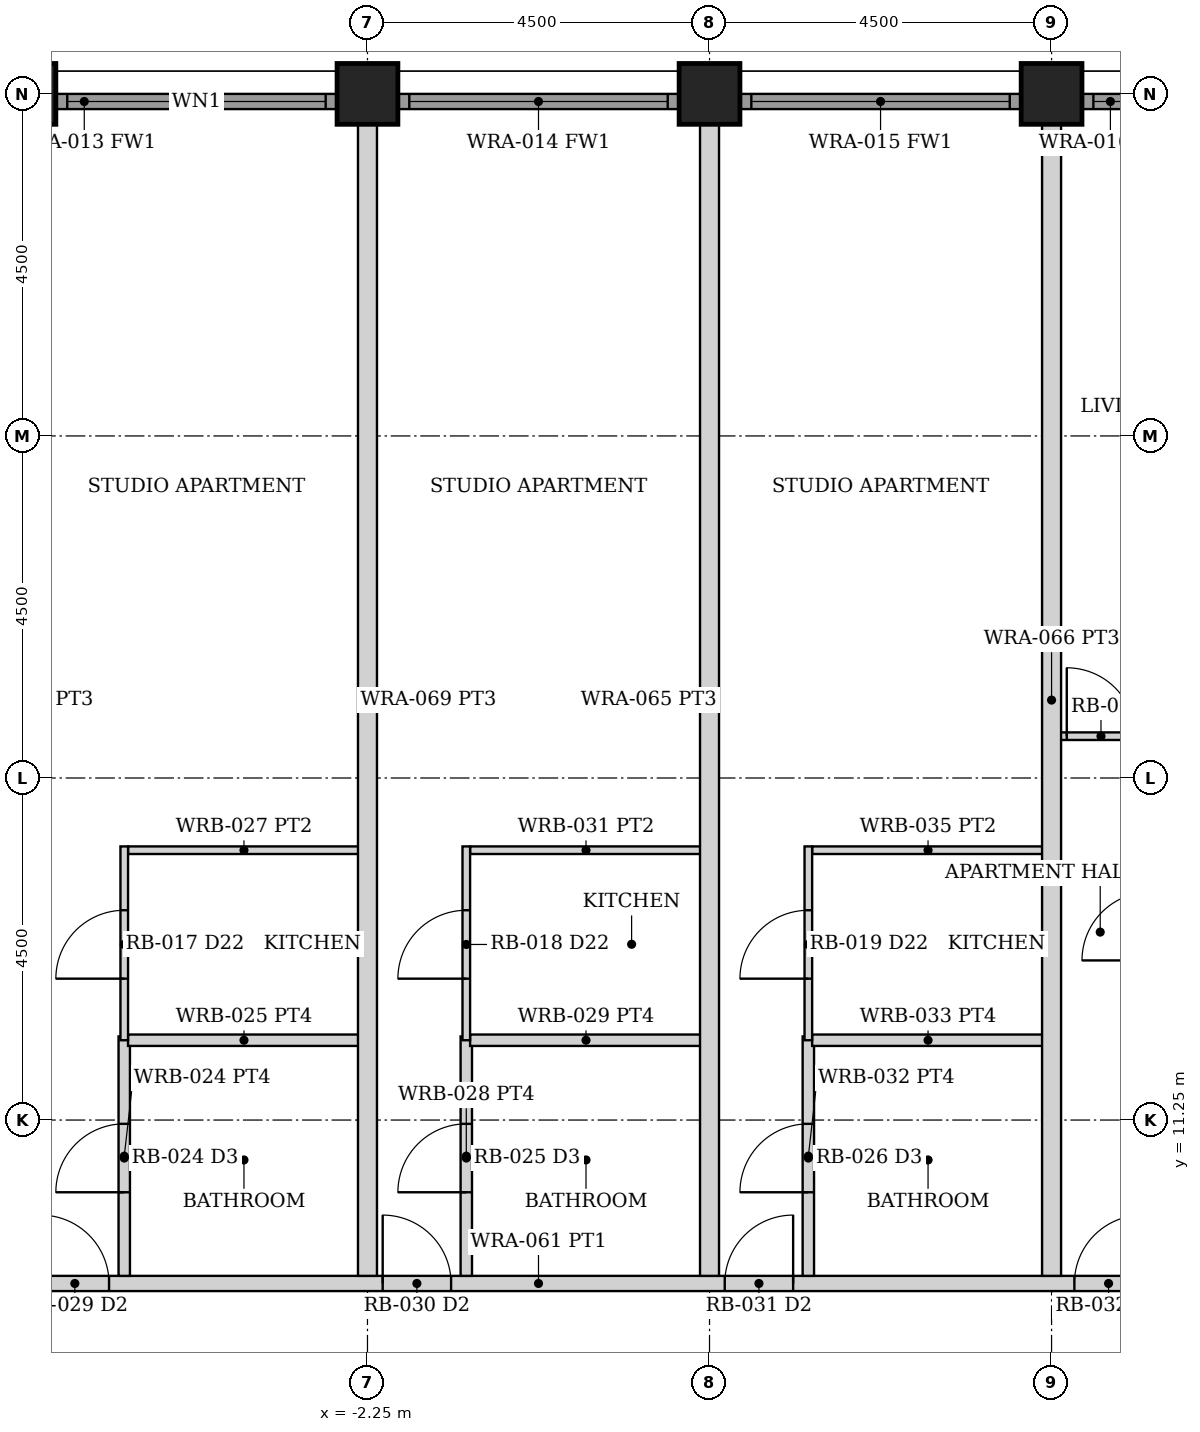
"""IFC4 building model, lengths in metres.
Left out: names, types, materials, properties, quantities, classifications, styles, units other than length and angle.
Written with IfcOpenShell. Run it as: python <this file> out.ifc"""

import sys

from ifc_helpers import new_model, si_unit, direction, frame, frame_2d, origin, origin_2d, place, context, subcontext, project, spatial, rectangle, hollow_rectangle, extrude, element, fill, save


model = new_model("IFC4")
c1 = context("Model", 3, precision=1e-05, world=origin(), true_north=direction((0.0, 1.0)))
c2 = subcontext(c1, "Body", "Model", "MODEL_VIEW")
j1 = project(units=[si_unit("LENGTHUNIT", "METRE"), si_unit("PLANEANGLEUNIT", "RADIAN")], contexts=[c1])
p1 = place(None, origin())
s1 = spatial("IfcSite", under=j1, at=p1, CompositionType="ELEMENT")
p2 = place(p1, origin())
s2 = spatial("IfcBuilding", under=s1, at=p2, CompositionType="ELEMENT")
p3 = place(p2, frame((0.0, 0.0, 37.0)))
s3 = spatial("IfcBuildingStorey", under=s2, at=p3, CompositionType="ELEMENT", Elevation=37.0)
for number, where, z_axis, x_axis in (
    (1, (-6.75, 24.75, 0.0), (0.0, 0.0, 1.0), (0.0, 1.0, 0.0)),
    (2, (-2.25, 24.75, 0.0), (0.0, 0.0, 1.0), (0.0, 1.0, 0.0)),
    (3, (2.25, 24.75, 0.0), (0.0, 0.0, 1.0), (0.0, 1.0, 0.0)),
    (4, (6.75, 24.75, 0.0), (0.0, 0.0, 1.0), (0.0, 1.0, 0.0)),
):
    element("IfcColumn", number, at=place(p3, frame(where, z_axis=z_axis, x_axis=x_axis)), inside=s3, PredefinedType="COLUMN", context=c2, shape_type="SweptSolid", body=[
        extrude(hollow_rectangle(XDim=0.8, YDim=0.8, WallThickness=0.07, at=origin_2d()), origin(), (0.0, 0.0, 1.0), 3.5),
    ])
p4 = place(p3, frame((-6.345, 24.65, 0.0), z_axis=(0.0, 0.0, 1.0), x_axis=(1.0, 0.0, 0.0)))
e5 = element("IfcWall", 5, at=p4, inside=s3, PredefinedType="SOLIDWALL", context=c2, shape_type="SweptSolid", body=[
    extrude(rectangle(XDim=3.69, YDim=0.2, at=frame_2d((1.845, 0.0))), origin(), (0.0, 0.0, 1.0), 2.379),
])
p5 = place(p4, frame((0.145, 0.0, 0.3)))
e6 = element("IfcOpeningElement", 6, at=p5, cuts=e5, PredefinedType="OPENING", context=c2, shape_type="SweptSolid", body=[
    extrude(rectangle(XDim=3.4, YDim=1.929, at=frame_2d((1.7, 0.964))), frame((0.0, 0.11, 0.0), z_axis=(0.0, -1.0, 0.0), x_axis=(1.0, 0.0, 0.0)), (0.0, 0.0, 1.0), 0.22),
])
p6 = place(p3, frame((-1.845, 24.65, 0.0), z_axis=(0.0, 0.0, 1.0), x_axis=(1.0, 0.0, 0.0)))
e7 = element("IfcWall", 7, at=p6, inside=s3, PredefinedType="SOLIDWALL", context=c2, shape_type="SweptSolid", body=[
    extrude(rectangle(XDim=3.69, YDim=0.2, at=frame_2d((1.845, 0.0))), origin(), (0.0, 0.0, 1.0), 2.379),
])
p7 = place(p6, frame((0.145, 0.0, 0.3)))
e8 = element("IfcOpeningElement", 8, at=p7, cuts=e7, PredefinedType="OPENING", context=c2, shape_type="SweptSolid", body=[
    extrude(rectangle(XDim=3.4, YDim=1.929, at=frame_2d((1.7, 0.964))), frame((0.0, 0.11, 0.0), z_axis=(0.0, -1.0, 0.0), x_axis=(1.0, 0.0, 0.0)), (0.0, 0.0, 1.0), 0.22),
])
p8 = place(p3, frame((2.655, 24.65, 0.0), z_axis=(0.0, 0.0, 1.0), x_axis=(1.0, 0.0, 0.0)))
e9 = element("IfcWall", 9, at=p8, inside=s3, PredefinedType="SOLIDWALL", context=c2, shape_type="SweptSolid", body=[
    extrude(rectangle(XDim=3.69, YDim=0.2, at=frame_2d((1.845, 0.0))), origin(), (0.0, 0.0, 1.0), 2.379),
])
p9 = place(p8, frame((0.145, 0.0, 0.3)))
e10 = element("IfcOpeningElement", 10, at=p9, cuts=e9, PredefinedType="OPENING", context=c2, shape_type="SweptSolid", body=[
    extrude(rectangle(XDim=3.4, YDim=1.929, at=frame_2d((1.7, 0.964))), frame((0.0, 0.11, 0.0), z_axis=(0.0, -1.0, 0.0), x_axis=(1.0, 0.0, 0.0)), (0.0, 0.0, 1.0), 0.22),
])
p10 = place(p3, frame((7.155, 24.65, 0.0), z_axis=(0.0, 0.0, 1.0), x_axis=(1.0, 0.0, 0.0)))
e11 = element("IfcWall", 11, at=p10, inside=s3, PredefinedType="SOLIDWALL", context=c2, shape_type="SweptSolid", body=[
    extrude(rectangle(XDim=3.69, YDim=0.2, at=frame_2d((1.845, 0.0))), origin(), (0.0, 0.0, 1.0), 2.379),
])
p11 = place(p10, frame((0.145, 0.0, 0.3)))
e12 = element("IfcOpeningElement", 12, at=p11, cuts=e11, PredefinedType="OPENING", context=c2, shape_type="SweptSolid", body=[
    extrude(rectangle(XDim=3.4, YDim=1.929, at=frame_2d((1.7, 0.964))), frame((0.0, 0.11, 0.0), z_axis=(0.0, -1.0, 0.0), x_axis=(1.0, 0.0, 0.0)), (0.0, 0.0, 1.0), 0.22),
])
p12 = place(p3, frame((-24.55, 9.1, 0.0), z_axis=(0.0, 0.0, 1.0), x_axis=(1.0, 0.0, 0.0)))
e13 = element("IfcWall", 13, at=p12, inside=s3, PredefinedType="PARTITIONING", context=c2, shape_type="SweptSolid", body=[
    extrude(rectangle(XDim=49.1, YDim=0.2, at=frame_2d((24.55, 0.0))), origin(), (0.0, 0.0, 1.0), 2.373),
])
p13 = place(p12, frame((5.1, 0.0, 0.0)))
e14 = element("IfcOpeningElement", 14, at=p13, cuts=e13, PredefinedType="OPENING", context=c2, shape_type="SweptSolid", body=[
    extrude(rectangle(XDim=0.9, YDim=2.1, at=frame_2d((0.45, 1.05))), frame((0.0, 0.11, 0.0), z_axis=(0.0, -1.0, 0.0), x_axis=(1.0, 0.0, 0.0)), (0.0, 0.0, 1.0), 0.22),
])
p14 = place(p12, frame((13.6, 0.0, 0.0)))
e15 = element("IfcOpeningElement", 15, at=p14, cuts=e13, PredefinedType="OPENING", context=c2, shape_type="SweptSolid", body=[
    extrude(rectangle(XDim=0.9, YDim=2.1, at=frame_2d((0.45, 1.05))), frame((0.0, 0.11, 0.0), z_axis=(0.0, -1.0, 0.0), x_axis=(1.0, 0.0, 0.0)), (0.0, 0.0, 1.0), 0.22),
])
p15 = place(p12, frame((18.0, 0.0, 0.0)))
e16 = element("IfcOpeningElement", 16, at=p15, cuts=e13, PredefinedType="OPENING", context=c2, shape_type="SweptSolid", body=[
    extrude(rectangle(XDim=0.9, YDim=2.1, at=frame_2d((0.45, 1.05))), frame((0.0, 0.11, 0.0), z_axis=(0.0, -1.0, 0.0), x_axis=(1.0, 0.0, 0.0)), (0.0, 0.0, 1.0), 0.22),
])
p16 = place(p12, frame((22.5, 0.0, 0.0)))
e17 = element("IfcOpeningElement", 17, at=p16, cuts=e13, PredefinedType="OPENING", context=c2, shape_type="SweptSolid", body=[
    extrude(rectangle(XDim=0.9, YDim=2.1, at=frame_2d((0.45, 1.05))), frame((0.0, 0.11, 0.0), z_axis=(0.0, -1.0, 0.0), x_axis=(1.0, 0.0, 0.0)), (0.0, 0.0, 1.0), 0.22),
])
p17 = place(p12, frame((27.0, 0.0, 0.0)))
e18 = element("IfcOpeningElement", 18, at=p17, cuts=e13, PredefinedType="OPENING", context=c2, shape_type="SweptSolid", body=[
    extrude(rectangle(XDim=0.9, YDim=2.1, at=frame_2d((0.45, 1.05))), frame((0.0, 0.11, 0.0), z_axis=(0.0, -1.0, 0.0), x_axis=(1.0, 0.0, 0.0)), (0.0, 0.0, 1.0), 0.22),
])
p18 = place(p12, frame((31.6, 0.0, 0.0)))
e19 = element("IfcOpeningElement", 19, at=p18, cuts=e13, PredefinedType="OPENING", context=c2, shape_type="SweptSolid", body=[
    extrude(rectangle(XDim=0.9, YDim=2.1, at=frame_2d((0.45, 1.05))), frame((0.0, 0.11, 0.0), z_axis=(0.0, -1.0, 0.0), x_axis=(1.0, 0.0, 0.0)), (0.0, 0.0, 1.0), 0.22),
])
p19 = place(p12, frame((43.1, 0.0, 0.0)))
e20 = element("IfcOpeningElement", 20, at=p19, cuts=e13, PredefinedType="OPENING", context=c2, shape_type="SweptSolid", body=[
    extrude(rectangle(XDim=0.9, YDim=2.1, at=frame_2d((0.45, 1.05))), frame((0.0, 0.11, 0.0), z_axis=(0.0, -1.0, 0.0), x_axis=(1.0, 0.0, 0.0)), (0.0, 0.0, 1.0), 0.22),
])
p20 = place(p3, frame((-5.45, 9.2, 0.0), z_axis=(0.0, 0.0, 1.0), x_axis=(0.0, 1.0, 0.0)))
e21 = element("IfcWall", 21, at=p20, inside=s3, PredefinedType="PARTITIONING", context=c2, shape_type="SweptSolid", body=[
    extrude(rectangle(XDim=3.15, YDim=0.15, at=frame_2d((1.575, 0.0))), origin(), (0.0, 0.0, 1.0), 2.373),
])
p21 = place(p20, frame((1.1, 0.0, 0.0)))
e22 = element("IfcOpeningElement", 22, at=p21, cuts=e21, PredefinedType="OPENING", context=c2, shape_type="SweptSolid", body=[
    extrude(rectangle(XDim=0.9, YDim=2.1, at=frame_2d((0.45, 1.05))), frame((0.0, 0.085, 0.0), z_axis=(0.0, -1.0, 0.0), x_axis=(1.0, 0.0, 0.0)), (0.0, 0.0, 1.0), 0.17),
])
p22 = place(p3, frame((-5.4, 12.3, 0.0), z_axis=(0.0, 0.0, 1.0), x_axis=(1.0, 0.0, 0.0)))
e23 = element("IfcWall", 23, at=p22, inside=s3, PredefinedType="PARTITIONING", context=c2, shape_type="SweptSolid", body=[
    extrude(rectangle(XDim=3.05, YDim=0.15, at=frame_2d((1.525, 0.0))), origin(), (0.0, 0.0, 1.0), 2.373),
])
p23 = place(p3, frame((-5.4, 14.8, 0.0), z_axis=(0.0, 0.0, 1.0), x_axis=(1.0, 0.0, 0.0)))
e24 = element("IfcWall", 24, at=p23, inside=s3, PredefinedType="PARTITIONING", context=c2, shape_type="SweptSolid", body=[
    extrude(rectangle(XDim=3.05, YDim=0.1, at=frame_2d((1.525, 0.0))), origin(), (0.0, 0.0, 1.0), 2.373),
])
p24 = place(p3, frame((-5.45, 12.3, 0.0), z_axis=(0.0, 0.0, 1.0), x_axis=(0.0, 1.0, 0.0)))
e25 = element("IfcWall", 25, at=p24, inside=s3, PredefinedType="PARTITIONING", context=c2, shape_type="SweptSolid", body=[
    extrude(rectangle(XDim=2.55, YDim=0.1, at=frame_2d((1.275, 0.0))), origin(), (0.0, 0.0, 1.0), 2.373),
])
p25 = place(p24, frame((0.81, 0.0, 0.0)))
e26 = element("IfcOpeningElement", 26, at=p25, cuts=e25, PredefinedType="OPENING", context=c2, shape_type="SweptSolid", body=[
    extrude(rectangle(XDim=0.9, YDim=2.1, at=frame_2d((0.45, 1.05))), frame((0.0, 0.06, 0.0), z_axis=(0.0, -1.0, 0.0), x_axis=(1.0, 0.0, 0.0)), (0.0, 0.0, 1.0), 0.12),
])
p26 = place(p3, frame((-0.95, 9.2, 0.0), z_axis=(0.0, 0.0, 1.0), x_axis=(0.0, 1.0, 0.0)))
e27 = element("IfcWall", 27, at=p26, inside=s3, PredefinedType="PARTITIONING", context=c2, shape_type="SweptSolid", body=[
    extrude(rectangle(XDim=3.15, YDim=0.15, at=frame_2d((1.575, 0.0))), origin(), (0.0, 0.0, 1.0), 2.373),
])
p27 = place(p26, frame((1.1, 0.0, 0.0)))
e28 = element("IfcOpeningElement", 28, at=p27, cuts=e27, PredefinedType="OPENING", context=c2, shape_type="SweptSolid", body=[
    extrude(rectangle(XDim=0.9, YDim=2.1, at=frame_2d((0.45, 1.05))), frame((0.0, 0.085, 0.0), z_axis=(0.0, -1.0, 0.0), x_axis=(1.0, 0.0, 0.0)), (0.0, 0.0, 1.0), 0.17),
])
p28 = place(p3, frame((-0.9, 12.3, 0.0), z_axis=(0.0, 0.0, 1.0), x_axis=(1.0, 0.0, 0.0)))
e29 = element("IfcWall", 29, at=p28, inside=s3, PredefinedType="PARTITIONING", context=c2, shape_type="SweptSolid", body=[
    extrude(rectangle(XDim=3.05, YDim=0.15, at=frame_2d((1.525, 0.0))), origin(), (0.0, 0.0, 1.0), 2.373),
])
p29 = place(p3, frame((-0.9, 14.8, 0.0), z_axis=(0.0, 0.0, 1.0), x_axis=(1.0, 0.0, 0.0)))
e30 = element("IfcWall", 30, at=p29, inside=s3, PredefinedType="PARTITIONING", context=c2, shape_type="SweptSolid", body=[
    extrude(rectangle(XDim=3.05, YDim=0.1, at=frame_2d((1.525, 0.0))), origin(), (0.0, 0.0, 1.0), 2.373),
])
p30 = place(p3, frame((-0.95, 12.3, 0.0), z_axis=(0.0, 0.0, 1.0), x_axis=(0.0, 1.0, 0.0)))
e31 = element("IfcWall", 31, at=p30, inside=s3, PredefinedType="PARTITIONING", context=c2, shape_type="SweptSolid", body=[
    extrude(rectangle(XDim=2.55, YDim=0.1, at=frame_2d((1.275, 0.0))), origin(), (0.0, 0.0, 1.0), 2.373),
])
p31 = place(p30, frame((0.81, 0.0, 0.0)))
e32 = element("IfcOpeningElement", 32, at=p31, cuts=e31, PredefinedType="OPENING", context=c2, shape_type="SweptSolid", body=[
    extrude(rectangle(XDim=0.9, YDim=2.1, at=frame_2d((0.45, 1.05))), frame((0.0, 0.06, 0.0), z_axis=(0.0, -1.0, 0.0), x_axis=(1.0, 0.0, 0.0)), (0.0, 0.0, 1.0), 0.12),
])
p32 = place(p3, frame((3.55, 9.2, 0.0), z_axis=(0.0, 0.0, 1.0), x_axis=(0.0, 1.0, 0.0)))
e33 = element("IfcWall", 33, at=p32, inside=s3, PredefinedType="PARTITIONING", context=c2, shape_type="SweptSolid", body=[
    extrude(rectangle(XDim=3.15, YDim=0.15, at=frame_2d((1.575, 0.0))), origin(), (0.0, 0.0, 1.0), 2.373),
])
p33 = place(p32, frame((1.1, 0.0, 0.0)))
e34 = element("IfcOpeningElement", 34, at=p33, cuts=e33, PredefinedType="OPENING", context=c2, shape_type="SweptSolid", body=[
    extrude(rectangle(XDim=0.9, YDim=2.1, at=frame_2d((0.45, 1.05))), frame((0.0, 0.085, 0.0), z_axis=(0.0, -1.0, 0.0), x_axis=(1.0, 0.0, 0.0)), (0.0, 0.0, 1.0), 0.17),
])
p34 = place(p3, frame((3.6, 12.3, 0.0), z_axis=(0.0, 0.0, 1.0), x_axis=(1.0, 0.0, 0.0)))
e35 = element("IfcWall", 35, at=p34, inside=s3, PredefinedType="PARTITIONING", context=c2, shape_type="SweptSolid", body=[
    extrude(rectangle(XDim=3.05, YDim=0.15, at=frame_2d((1.525, 0.0))), origin(), (0.0, 0.0, 1.0), 2.373),
])
p35 = place(p3, frame((3.6, 14.8, 0.0), z_axis=(0.0, 0.0, 1.0), x_axis=(1.0, 0.0, 0.0)))
e36 = element("IfcWall", 36, at=p35, inside=s3, PredefinedType="PARTITIONING", context=c2, shape_type="SweptSolid", body=[
    extrude(rectangle(XDim=3.05, YDim=0.1, at=frame_2d((1.525, 0.0))), origin(), (0.0, 0.0, 1.0), 2.373),
])
p36 = place(p3, frame((3.55, 12.3, 0.0), z_axis=(0.0, 0.0, 1.0), x_axis=(0.0, 1.0, 0.0)))
e37 = element("IfcWall", 37, at=p36, inside=s3, PredefinedType="PARTITIONING", context=c2, shape_type="SweptSolid", body=[
    extrude(rectangle(XDim=2.55, YDim=0.1, at=frame_2d((1.275, 0.0))), origin(), (0.0, 0.0, 1.0), 2.373),
])
p37 = place(p36, frame((0.81, 0.0, 0.0)))
e38 = element("IfcOpeningElement", 38, at=p37, cuts=e37, PredefinedType="OPENING", context=c2, shape_type="SweptSolid", body=[
    extrude(rectangle(XDim=0.9, YDim=2.1, at=frame_2d((0.45, 1.05))), frame((0.0, 0.06, 0.0), z_axis=(0.0, -1.0, 0.0), x_axis=(1.0, 0.0, 0.0)), (0.0, 0.0, 1.0), 0.12),
])
p38 = place(p3, frame((6.81, 16.3, 0.0), z_axis=(0.0, 0.0, 1.0), x_axis=(1.0, 0.0, 0.0)))
e39 = element("IfcWall", 39, at=p38, inside=s3, PredefinedType="PARTITIONING", context=c2, shape_type="SweptSolid", body=[
    extrude(rectangle(XDim=4.39, YDim=0.1, at=frame_2d((2.195, 0.0))), origin(), (0.0, 0.0, 1.0), 2.373),
])
p39 = place(p38, frame((0.14, 0.0, 0.0)))
e40 = element("IfcOpeningElement", 40, at=p39, cuts=e39, PredefinedType="OPENING", context=c2, shape_type="SweptSolid", body=[
    extrude(rectangle(XDim=0.9, YDim=2.1, at=frame_2d((0.45, 1.05))), frame((0.0, 0.06, 0.0), z_axis=(0.0, -1.0, 0.0), x_axis=(1.0, 0.0, 0.0)), (0.0, 0.0, 1.0), 0.12),
])
for number, where, z_axis, x_axis in (
    (41, (-2.25, 9.2, 0.0), (0.0, 0.0, 1.0), (0.0, 1.0, 0.0)),
    (42, (2.25, 9.2, 0.0), (0.0, 0.0, 1.0), (0.0, 1.0, 0.0)),
    (43, (6.75, 9.2, 0.0), (0.0, 0.0, 1.0), (0.0, 1.0, 0.0)),
):
    element("IfcWall", number, at=place(p3, frame(where, z_axis=z_axis, x_axis=x_axis)), inside=s3, PredefinedType="PARTITIONING", context=c2, shape_type="SweptSolid", body=[
        extrude(rectangle(XDim=15.15, YDim=0.25, at=frame_2d((7.575, 0.0))), origin(), (0.0, 0.0, 1.0), 2.373),
    ])
p40 = place(p5, origin())
e44 = element("IfcWindow", 44, at=p40, inside=s3, PartitioningType="SINGLE_PANEL", PredefinedType="WINDOW", context=c2, shape_type="SweptSolid", body=[
    extrude(rectangle(XDim=3.4, YDim=1.929, at=frame_2d((1.7, 0.964))), frame((0.0, 0.03, 0.0), z_axis=(0.0, -1.0, 0.0), x_axis=(1.0, 0.0, 0.0)), (0.0, 0.0, 1.0), 0.06),
])
fill(e6, e44)
p41 = place(p7, origin())
e45 = element("IfcWindow", 45, at=p41, inside=s3, PartitioningType="SINGLE_PANEL", PredefinedType="WINDOW", context=c2, shape_type="SweptSolid", body=[
    extrude(rectangle(XDim=3.4, YDim=1.929, at=frame_2d((1.7, 0.964))), frame((0.0, 0.03, 0.0), z_axis=(0.0, -1.0, 0.0), x_axis=(1.0, 0.0, 0.0)), (0.0, 0.0, 1.0), 0.06),
])
fill(e8, e45)
p42 = place(p9, origin())
e46 = element("IfcWindow", 46, at=p42, inside=s3, PartitioningType="SINGLE_PANEL", PredefinedType="WINDOW", context=c2, shape_type="SweptSolid", body=[
    extrude(rectangle(XDim=3.4, YDim=1.929, at=frame_2d((1.7, 0.964))), frame((0.0, 0.03, 0.0), z_axis=(0.0, -1.0, 0.0), x_axis=(1.0, 0.0, 0.0)), (0.0, 0.0, 1.0), 0.06),
])
fill(e10, e46)
p43 = place(p11, origin())
e47 = element("IfcWindow", 47, at=p43, inside=s3, PartitioningType="SINGLE_PANEL", PredefinedType="WINDOW", context=c2, shape_type="SweptSolid", body=[
    extrude(rectangle(XDim=3.4, YDim=1.929, at=frame_2d((1.7, 0.964))), frame((0.0, 0.03, 0.0), z_axis=(0.0, -1.0, 0.0), x_axis=(1.0, 0.0, 0.0)), (0.0, 0.0, 1.0), 0.06),
])
fill(e12, e47)
p44 = place(p15, origin())
e48 = element("IfcDoor", 48, at=p44, inside=s3, OperationType="SINGLE_SWING_LEFT", PredefinedType="DOOR", context=c2, shape_type="SweptSolid", body=[
    extrude(rectangle(XDim=0.9, YDim=2.1, at=frame_2d((0.45, 1.05))), frame((0.0, 0.025, 0.0), z_axis=(0.0, -1.0, 0.0), x_axis=(1.0, 0.0, 0.0)), (0.0, 0.0, 1.0), 0.05),
])
fill(e16, e48)
p45 = place(p21, origin())
e49 = element("IfcDoor", 49, at=p45, inside=s3, OperationType="SINGLE_SWING_LEFT", PredefinedType="DOOR", context=c2, shape_type="SweptSolid", body=[
    extrude(rectangle(XDim=0.9, YDim=2.1, at=frame_2d((0.45, 1.05))), frame((0.0, 0.025, 0.0), z_axis=(0.0, -1.0, 0.0), x_axis=(1.0, 0.0, 0.0)), (0.0, 0.0, 1.0), 0.05),
])
fill(e22, e49)
p46 = place(p25, origin())
e50 = element("IfcDoor", 50, at=p46, inside=s3, OperationType="SINGLE_SWING_LEFT", PredefinedType="DOOR", context=c2, shape_type="SweptSolid", body=[
    extrude(rectangle(XDim=0.9, YDim=2.1, at=frame_2d((0.45, 1.05))), frame((0.0, 0.025, 0.0), z_axis=(0.0, -1.0, 0.0), x_axis=(1.0, 0.0, 0.0)), (0.0, 0.0, 1.0), 0.05),
])
fill(e26, e50)
p47 = place(p16, origin())
e51 = element("IfcDoor", 51, at=p47, inside=s3, OperationType="SINGLE_SWING_LEFT", PredefinedType="DOOR", context=c2, shape_type="SweptSolid", body=[
    extrude(rectangle(XDim=0.9, YDim=2.1, at=frame_2d((0.45, 1.05))), frame((0.0, 0.025, 0.0), z_axis=(0.0, -1.0, 0.0), x_axis=(1.0, 0.0, 0.0)), (0.0, 0.0, 1.0), 0.05),
])
fill(e17, e51)
p48 = place(p27, origin())
e52 = element("IfcDoor", 52, at=p48, inside=s3, OperationType="SINGLE_SWING_LEFT", PredefinedType="DOOR", context=c2, shape_type="SweptSolid", body=[
    extrude(rectangle(XDim=0.9, YDim=2.1, at=frame_2d((0.45, 1.05))), frame((0.0, 0.025, 0.0), z_axis=(0.0, -1.0, 0.0), x_axis=(1.0, 0.0, 0.0)), (0.0, 0.0, 1.0), 0.05),
])
fill(e28, e52)
p49 = place(p31, origin())
e53 = element("IfcDoor", 53, at=p49, inside=s3, OperationType="SINGLE_SWING_LEFT", PredefinedType="DOOR", context=c2, shape_type="SweptSolid", body=[
    extrude(rectangle(XDim=0.9, YDim=2.1, at=frame_2d((0.45, 1.05))), frame((0.0, 0.025, 0.0), z_axis=(0.0, -1.0, 0.0), x_axis=(1.0, 0.0, 0.0)), (0.0, 0.0, 1.0), 0.05),
])
fill(e32, e53)
p50 = place(p17, origin())
e54 = element("IfcDoor", 54, at=p50, inside=s3, OperationType="SINGLE_SWING_RIGHT", PredefinedType="DOOR", context=c2, shape_type="SweptSolid", body=[
    extrude(rectangle(XDim=0.9, YDim=2.1, at=frame_2d((0.45, 1.05))), frame((0.0, 0.025, 0.0), z_axis=(0.0, -1.0, 0.0), x_axis=(1.0, 0.0, 0.0)), (0.0, 0.0, 1.0), 0.05),
])
fill(e18, e54)
p51 = place(p33, origin())
e55 = element("IfcDoor", 55, at=p51, inside=s3, OperationType="SINGLE_SWING_LEFT", PredefinedType="DOOR", context=c2, shape_type="SweptSolid", body=[
    extrude(rectangle(XDim=0.9, YDim=2.1, at=frame_2d((0.45, 1.05))), frame((0.0, 0.025, 0.0), z_axis=(0.0, -1.0, 0.0), x_axis=(1.0, 0.0, 0.0)), (0.0, 0.0, 1.0), 0.05),
])
fill(e34, e55)
p52 = place(p37, origin())
e56 = element("IfcDoor", 56, at=p52, inside=s3, OperationType="SINGLE_SWING_LEFT", PredefinedType="DOOR", context=c2, shape_type="SweptSolid", body=[
    extrude(rectangle(XDim=0.9, YDim=2.1, at=frame_2d((0.45, 1.05))), frame((0.0, 0.025, 0.0), z_axis=(0.0, -1.0, 0.0), x_axis=(1.0, 0.0, 0.0)), (0.0, 0.0, 1.0), 0.05),
])
fill(e38, e56)
p53 = place(p18, origin())
e57 = element("IfcDoor", 57, at=p53, inside=s3, OperationType="SINGLE_SWING_RIGHT", PredefinedType="DOOR", context=c2, shape_type="SweptSolid", body=[
    extrude(rectangle(XDim=0.9, YDim=2.1, at=frame_2d((0.45, 1.05))), frame((0.0, 0.025, 0.0), z_axis=(0.0, -1.0, 0.0), x_axis=(1.0, 0.0, 0.0)), (0.0, 0.0, 1.0), 0.05),
])
fill(e19, e57)
p54 = place(p39, origin())
e58 = element("IfcDoor", 58, at=p54, inside=s3, OperationType="SINGLE_SWING_LEFT", PredefinedType="DOOR", context=c2, shape_type="SweptSolid", body=[
    extrude(rectangle(XDim=0.9, YDim=2.1, at=frame_2d((0.45, 1.05))), frame((0.0, 0.025, 0.0), z_axis=(0.0, -1.0, 0.0), x_axis=(1.0, 0.0, 0.0)), (0.0, 0.0, 1.0), 0.05),
])
fill(e40, e58)
save(model, sys.argv[1])
